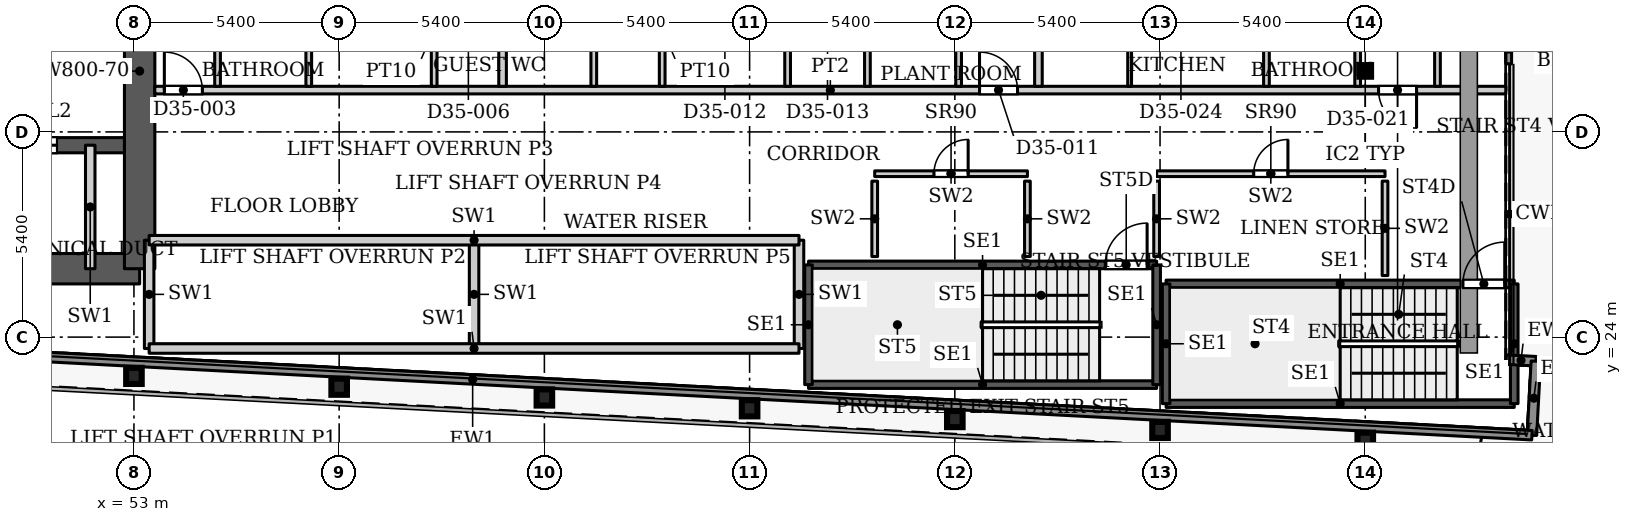
"""IFC4 building model, lengths in metres.
Left out: names, types, materials, properties, quantities, classifications, styles, units other than length and angle.
Written with IfcOpenShell. Run it as: python <this file> out.ifc"""

import sys

from ifc_helpers import new_model, si_unit, direction, frame, frame_2d, origin, origin_2d, place, context, subcontext, project, spatial, rectangle, hollow_rectangle, i_section, extrude, source, transform, mapped, element, fill, save


model = new_model("IFC4")
c1 = context("Model", 3, precision=1e-05, world=origin(), true_north=direction((0.0, 1.0)))
c2 = subcontext(c1, "Body", "Model", "MODEL_VIEW")
j1 = project(units=[si_unit("LENGTHUNIT", "METRE"), si_unit("PLANEANGLEUNIT", "RADIAN")], contexts=[c1])
p1 = place(None, origin())
s1 = spatial("IfcSite", under=j1, at=p1, CompositionType="ELEMENT")
p2 = place(p1, origin())
s2 = spatial("IfcBuilding", under=s1, at=p2, CompositionType="ELEMENT")
p3 = place(p2, frame((0.0, 0.0, 152.6)))
s3 = spatial("IfcBuildingStorey", under=s2, at=p3, CompositionType="ELEMENT", Elevation=152.6)
for number, where, z_axis, x_axis in (
    (1, (85.4, 21.274, 0.0), (0.0, 0.0, 1.0), (1.0, 0.0, 0.0)),
    (2, (80.0, 21.558, 0.0), (0.0, 0.0, 1.0), (1.0, 0.0, 0.0)),
    (3, (74.6, 21.843, 0.0), (0.0, 0.0, 1.0), (1.0, 0.0, 0.0)),
    (4, (69.2, 22.127, 0.0), (0.0, 0.0, 1.0), (1.0, 0.0, 0.0)),
    (5, (63.8, 22.411, 0.0), (0.0, 0.0, 1.0), (1.0, 0.0, 0.0)),
    (6, (58.4, 22.695, 0.0), (0.0, 0.0, 1.0), (1.0, 0.0, 0.0)),
    (7, (53.0, 22.98, 0.0), (0.0, 0.0, 1.0), (1.0, 0.0, 0.0)),
):
    element("IfcColumn", number, at=place(p3, frame(where, z_axis=z_axis, x_axis=x_axis)), inside=s3, PredefinedType="COLUMN", context=c2, shape_type="SweptSolid", body=[
        extrude(i_section(OverallWidth=0.409, OverallDepth=0.425, WebThickness=0.033, FlangeThickness=0.052, FilletRadius=0.013, at=origin_2d()), origin(), (0.0, 0.0, 1.0), 3.9),
    ])
p4 = place(p3, frame((85.4, 31.005, 0.0), z_axis=(0.0, 0.0, 1.0), x_axis=(1.0, 0.0, 0.0)))
e8 = element("IfcColumn", 8, at=p4, inside=s3, PredefinedType="COLUMN", context=c2, shape_type="SweptSolid", body=[
    extrude(hollow_rectangle(XDim=0.305, YDim=0.305, WallThickness=0.016, InnerFilletRadius=0.016, OuterFilletRadius=0.032, at=origin_2d()), origin(), (0.0, 0.0, 1.0), 3.9),
])
p5 = place(p3, frame((34.75, 25.8, 0.0), z_axis=(0.0, 0.0, 1.0), x_axis=(1.0, 0.0, 0.0)))
e9 = element("IfcWall", 9, at=p5, inside=s3, PredefinedType="SHEAR", context=c2, shape_type="SweptSolid", body=[
    extrude(rectangle(XDim=18.4, YDim=0.8, at=frame_2d((9.2, 0.0))), origin(), (0.0, 0.0, 1.0), 3.9),
])
p6 = place(p3, frame((34.75, 29.05, 0.0), z_axis=(0.0, 0.0, 1.0), x_axis=(1.0, 0.0, 0.0)))
e10 = element("IfcWall", 10, at=p6, inside=s3, PredefinedType="SHEAR", context=c2, shape_type="SweptSolid", body=[
    extrude(rectangle(XDim=18.4, YDim=0.4, at=frame_2d((9.2, 0.0))), origin(), (0.0, 0.0, 1.0), 3.9),
])
p7 = place(p6, frame((0.875, 0.0, 0.0)))
e11 = element("IfcOpeningElement", 11, at=p7, cuts=e10, PredefinedType="OPENING", context=c2, shape_type="SweptSolid", body=[
    extrude(rectangle(XDim=1.1, YDim=2.2, at=frame_2d((0.55, 1.1))), frame((0.0, 0.21, 0.0), z_axis=(0.0, -1.0, 0.0), x_axis=(1.0, 0.0, 0.0)), (0.0, 0.0, 1.0), 0.42),
])
p8 = place(p6, frame((3.725, 0.0, 0.0)))
e12 = element("IfcOpeningElement", 12, at=p8, cuts=e10, PredefinedType="OPENING", context=c2, shape_type="SweptSolid", body=[
    extrude(rectangle(XDim=1.1, YDim=2.2, at=frame_2d((0.55, 1.1))), frame((0.0, 0.21, 0.0), z_axis=(0.0, -1.0, 0.0), x_axis=(1.0, 0.0, 0.0)), (0.0, 0.0, 1.0), 0.42),
])
p9 = place(p6, frame((6.575, 0.0, 0.0)))
e13 = element("IfcOpeningElement", 13, at=p9, cuts=e10, PredefinedType="OPENING", context=c2, shape_type="SweptSolid", body=[
    extrude(rectangle(XDim=1.1, YDim=2.2, at=frame_2d((0.55, 1.1))), frame((0.0, 0.21, 0.0), z_axis=(0.0, -1.0, 0.0), x_axis=(1.0, 0.0, 0.0)), (0.0, 0.0, 1.0), 0.42),
])
p10 = place(p6, frame((9.425, 0.0, 0.0)))
e14 = element("IfcOpeningElement", 14, at=p10, cuts=e10, PredefinedType="OPENING", context=c2, shape_type="SweptSolid", body=[
    extrude(rectangle(XDim=1.1, YDim=2.2, at=frame_2d((0.55, 1.1))), frame((0.0, 0.21, 0.0), z_axis=(0.0, -1.0, 0.0), x_axis=(1.0, 0.0, 0.0)), (0.0, 0.0, 1.0), 0.42),
])
p11 = place(p6, frame((12.275, 0.0, 0.0)))
e15 = element("IfcOpeningElement", 15, at=p11, cuts=e10, PredefinedType="OPENING", context=c2, shape_type="SweptSolid", body=[
    extrude(rectangle(XDim=1.1, YDim=2.2, at=frame_2d((0.55, 1.1))), frame((0.0, 0.21, 0.0), z_axis=(0.0, -1.0, 0.0), x_axis=(1.0, 0.0, 0.0)), (0.0, 0.0, 1.0), 0.42),
])
p12 = place(p6, frame((15.125, 0.0, 0.0)))
e16 = element("IfcOpeningElement", 16, at=p12, cuts=e10, PredefinedType="OPENING", context=c2, shape_type="SweptSolid", body=[
    extrude(rectangle(XDim=1.1, YDim=2.2, at=frame_2d((0.55, 1.1))), frame((0.0, 0.21, 0.0), z_axis=(0.0, -1.0, 0.0), x_axis=(1.0, 0.0, 0.0)), (0.0, 0.0, 1.0), 0.42),
])
p13 = place(p3, frame((53.15, 25.8, 0.0), z_axis=(0.0, 0.0, 1.0), x_axis=(0.0, 1.0, 0.0)))
e17 = element("IfcWall", 17, at=p13, inside=s3, PredefinedType="SHEAR", context=c2, shape_type="SweptSolid", body=[
    extrude(rectangle(XDim=10.4, YDim=0.8, at=frame_2d((5.2, 0.0))), origin(), (0.0, 0.0, 1.0), 3.9),
])
p14 = place(p3, frame((89.175, 33.591, 0.0), z_axis=(0.0, 0.0, 1.0), x_axis=(0.0, -1.0, 0.0)))
e18 = element("IfcWall", 18, at=p14, inside=s3, PredefinedType="SOLIDWALL", context=c2, shape_type="SweptSolid", body=[
    extrude(rectangle(XDim=2.4, YDim=0.15, at=frame_2d((1.2, 0.0))), origin(), (0.0, 0.0, 1.0), 3.75),
])
p15 = place(p14, frame((0.3, 0.0, 0.0)))
e19 = element("IfcOpeningElement", 19, at=p15, cuts=e18, PredefinedType="OPENING", context=c2, shape_type="SweptSolid", body=[
    extrude(rectangle(XDim=1.8, YDim=2.4, at=frame_2d((0.9, 1.2))), frame((0.0, 0.085, 0.0), z_axis=(0.0, -1.0, 0.0), x_axis=(1.0, 0.0, 0.0)), (0.0, 0.0, 1.0), 0.17),
])
p16 = place(p3, frame((89.107, 23.408, 0.0), z_axis=(0.0, 0.0, 1.0), x_axis=(0.998561284263, -0.053622398031, 0.0)))
e20 = element("IfcWall", 20, at=p16, inside=s3, PredefinedType="SOLIDWALL", context=c2, shape_type="SweptSolid", body=[
    extrude(rectangle(XDim=0.783, YDim=0.25, at=frame_2d((0.392, 0.0))), origin(), (0.0, 0.0, 1.0), 3.75),
])
p17 = place(p3, frame((89.889, 23.366, 0.0), z_axis=(0.0, 0.0, 1.0), x_axis=(-0.052841433274, -0.998602915542, 0.0)))
e21 = element("IfcWall", 21, at=p17, inside=s3, PredefinedType="SOLIDWALL", context=c2, shape_type="SweptSolid", body=[
    extrude(rectangle(XDim=1.95, YDim=0.25, at=frame_2d((0.975, 0.0))), origin(), (0.0, 0.0, 1.0), 3.75),
])
p18 = place(p3, frame((89.786, 21.419, 0.0), z_axis=(0.0, 0.0, 1.0), x_axis=(-0.998617793089, 0.052559521752, 0.0)))
e22 = element("IfcWall", 22, at=p18, inside=s3, PredefinedType="SOLIDWALL", context=c2, shape_type="SweptSolid", body=[
    extrude(rectangle(XDim=55.824, YDim=0.25, at=frame_2d((27.912, 0.0))), origin(), (0.0, 0.0, 1.0), 3.75),
])
p19 = place(p3, frame((80.16, 22.25, 0.0), z_axis=(0.0, 0.0, 1.0), x_axis=(1.0, 0.0, 0.0)))
e23 = element("IfcWall", 23, at=p19, inside=s3, PredefinedType="SHEAR", context=c2, shape_type="SweptSolid", body=[
    extrude(rectangle(XDim=9.16, YDim=0.2, at=frame_2d((4.58, 0.0))), origin(), (0.0, 0.0, 1.0), 3.9),
])
p20 = place(p3, frame((80.16, 25.4, 0.0), z_axis=(0.0, 0.0, 1.0), x_axis=(1.0, 0.0, 0.0)))
e24 = element("IfcWall", 24, at=p20, inside=s3, PredefinedType="SHEAR", context=c2, shape_type="SweptSolid", body=[
    extrude(rectangle(XDim=9.16, YDim=0.2, at=frame_2d((4.58, 0.0))), origin(), (0.0, 0.0, 1.0), 3.9),
])
p21 = place(p20, frame((7.81, 0.0, 0.0)))
e25 = element("IfcOpeningElement", 25, at=p21, cuts=e24, PredefinedType="OPENING", context=c2, shape_type="SweptSolid", body=[
    extrude(rectangle(XDim=1.1, YDim=2.2, at=frame_2d((0.55, 1.1))), frame((0.0, 0.11, 0.0), z_axis=(0.0, -1.0, 0.0), x_axis=(1.0, 0.0, 0.0)), (0.0, 0.0, 1.0), 0.22),
])
for number, where, z_axis, x_axis in (
    (26, (80.16, 22.25, 0.0), (0.0, 0.0, 1.0), (0.0, 1.0, 0.0)),
    (27, (89.32, 22.25, 0.0), (0.0, 0.0, 1.0), (0.0, 1.0, 0.0)),
):
    element("IfcWall", number, at=place(p3, frame(where, z_axis=z_axis, x_axis=x_axis)), inside=s3, PredefinedType="SHEAR", context=c2, shape_type="SweptSolid", body=[
        extrude(rectangle(XDim=3.15, YDim=0.2, at=frame_2d((1.575, 0.0))), origin(), (0.0, 0.0, 1.0), 3.9),
    ])
p22 = place(p3, frame((70.75, 22.75, 0.0), z_axis=(0.0, 0.0, 1.0), x_axis=(1.0, 0.0, 0.0)))
e28 = element("IfcWall", 28, at=p22, inside=s3, PredefinedType="SHEAR", context=c2, shape_type="SweptSolid", body=[
    extrude(rectangle(XDim=9.16, YDim=0.2, at=frame_2d((4.58, 0.0))), origin(), (0.0, 0.0, 1.0), 3.9),
])
p23 = place(p3, frame((70.75, 25.9, 0.0), z_axis=(0.0, 0.0, 1.0), x_axis=(1.0, 0.0, 0.0)))
e29 = element("IfcWall", 29, at=p23, inside=s3, PredefinedType="SHEAR", context=c2, shape_type="SweptSolid", body=[
    extrude(rectangle(XDim=9.16, YDim=0.2, at=frame_2d((4.58, 0.0))), origin(), (0.0, 0.0, 1.0), 3.9),
])
p24 = place(p23, frame((7.81, 0.0, 0.0)))
e30 = element("IfcOpeningElement", 30, at=p24, cuts=e29, PredefinedType="OPENING", context=c2, shape_type="SweptSolid", body=[
    extrude(rectangle(XDim=1.1, YDim=2.2, at=frame_2d((0.55, 1.1))), frame((0.0, 0.11, 0.0), z_axis=(0.0, -1.0, 0.0), x_axis=(1.0, 0.0, 0.0)), (0.0, 0.0, 1.0), 0.22),
])
for number, where, z_axis, x_axis in (
    (31, (70.75, 22.75, 0.0), (0.0, 0.0, 1.0), (0.0, 1.0, 0.0)),
    (32, (79.91, 22.75, 0.0), (0.0, 0.0, 1.0), (0.0, 1.0, 0.0)),
):
    element("IfcWall", number, at=place(p3, frame(where, z_axis=z_axis, x_axis=x_axis)), inside=s3, PredefinedType="SHEAR", context=c2, shape_type="SweptSolid", body=[
        extrude(rectangle(XDim=3.15, YDim=0.2, at=frame_2d((1.575, 0.0))), origin(), (0.0, 0.0, 1.0), 3.9),
    ])
p25 = place(p3, frame((51.85, 25.8, 0.0), z_axis=(0.0, 0.0, 1.0), x_axis=(0.0, 1.0, 0.0)))
e33 = element("IfcWall", 33, at=p25, inside=s3, PredefinedType="PARTITIONING", context=c2, shape_type="SweptSolid", body=[
    extrude(rectangle(XDim=3.25, YDim=0.25, at=frame_2d((1.625, 0.0))), origin(), (0.0, 0.0, 1.0), 3.9),
])
for number, where, z_axis, x_axis in (
    (34, (53.4, 23.7, 0.0), (0.0, 0.0, 1.0), (0.0, 1.0, 0.0)),
    (35, (61.95, 23.7, 0.0), (0.0, 0.0, 1.0), (0.0, 1.0, 0.0)),
    (36, (70.5, 23.7, 0.0), (0.0, 0.0, 1.0), (0.0, 1.0, 0.0)),
):
    element("IfcWall", number, at=place(p3, frame(where, z_axis=z_axis, x_axis=x_axis)), inside=s3, PredefinedType="PARTITIONING", context=c2, shape_type="SweptSolid", body=[
        extrude(rectangle(XDim=2.85, YDim=0.25, at=frame_2d((1.425, 0.0))), origin(), (0.0, 0.0, 1.0), 3.9),
    ])
for number, where, z_axis, x_axis in (
    (37, (53.4, 23.7, 0.0), (0.0, 0.0, 1.0), (1.0, 0.0, 0.0)),
    (38, (53.4, 26.55, 0.0), (0.0, 0.0, 1.0), (1.0, 0.0, 0.0)),
):
    element("IfcWall", number, at=place(p3, frame(where, z_axis=z_axis, x_axis=x_axis)), inside=s3, PredefinedType="PARTITIONING", context=c2, shape_type="SweptSolid", body=[
        extrude(rectangle(XDim=17.1, YDim=0.25, at=frame_2d((8.55, 0.0))), origin(), (0.0, 0.0, 1.0), 3.9),
    ])
p26 = place(p3, frame((72.492, 28.3, 0.0), z_axis=(0.0, 0.0, 1.0), x_axis=(1.0, 0.0, 0.0)))
e39 = element("IfcWall", 39, at=p26, inside=s3, PredefinedType="PARTITIONING", context=c2, shape_type="SweptSolid", body=[
    extrude(rectangle(XDim=4.018, YDim=0.15, at=frame_2d((2.009, 0.0))), origin(), (0.0, 0.0, 1.0), 3.9),
])
p27 = place(p26, frame((1.559, 0.0, 0.0)))
e40 = element("IfcOpeningElement", 40, at=p27, cuts=e39, PredefinedType="OPENING", context=c2, shape_type="SweptSolid", body=[
    extrude(rectangle(XDim=0.9, YDim=2.2, at=frame_2d((0.45, 1.1))), frame((0.0, 0.085, 0.0), z_axis=(0.0, -1.0, 0.0), x_axis=(1.0, 0.0, 0.0)), (0.0, 0.0, 1.0), 0.17),
])
for number, where, z_axis, x_axis in (
    (41, (72.492, 26.12, 0.0), (0.0, 0.0, 1.0), (0.0, 1.0, 0.0)),
    (42, (76.51, 26.12, 0.0), (0.0, 0.0, 1.0), (0.0, 1.0, 0.0)),
):
    element("IfcWall", number, at=place(p3, frame(where, z_axis=z_axis, x_axis=x_axis)), inside=s3, PredefinedType="PARTITIONING", context=c2, shape_type="SweptSolid", body=[
        extrude(rectangle(XDim=1.985, YDim=0.15, at=frame_2d((0.992, 0.0))), origin(), (0.0, 0.0, 1.0), 3.9),
    ])
p28 = place(p3, frame((79.91, 28.3, 0.0), z_axis=(0.0, 0.0, 1.0), x_axis=(1.0, 0.0, 0.0)))
e43 = element("IfcWall", 43, at=p28, inside=s3, PredefinedType="PARTITIONING", context=c2, shape_type="SweptSolid", body=[
    extrude(rectangle(XDim=6.01, YDim=0.15, at=frame_2d((3.005, 0.0))), origin(), (0.0, 0.0, 1.0), 3.9),
])
p29 = place(p28, frame((2.555, 0.0, 0.0)))
e44 = element("IfcOpeningElement", 44, at=p29, cuts=e43, PredefinedType="OPENING", context=c2, shape_type="SweptSolid", body=[
    extrude(rectangle(XDim=0.9, YDim=2.2, at=frame_2d((0.45, 1.1))), frame((0.0, 0.085, 0.0), z_axis=(0.0, -1.0, 0.0), x_axis=(1.0, 0.0, 0.0)), (0.0, 0.0, 1.0), 0.17),
])
p30 = place(p3, frame((79.91, 26.12, 0.0), z_axis=(0.0, 0.0, 1.0), x_axis=(0.0, 1.0, 0.0)))
e45 = element("IfcWall", 45, at=p30, inside=s3, PredefinedType="PARTITIONING", context=c2, shape_type="SweptSolid", body=[
    extrude(rectangle(XDim=1.985, YDim=0.15, at=frame_2d((0.992, 0.0))), origin(), (0.0, 0.0, 1.0), 3.9),
])
p31 = place(p3, frame((85.92, 25.62, 0.0), z_axis=(0.0, 0.0, 1.0), x_axis=(0.0, 1.0, 0.0)))
e46 = element("IfcWall", 46, at=p31, inside=s3, PredefinedType="PARTITIONING", context=c2, shape_type="SweptSolid", body=[
    extrude(rectangle(XDim=2.485, YDim=0.15, at=frame_2d((1.242, 0.0))), origin(), (0.0, 0.0, 1.0), 3.9),
])
p32 = place(p3, frame((53.549, 30.5, 0.0), z_axis=(0.0, 0.0, 1.0), x_axis=(1.0, 0.0, 0.0)))
e47 = element("IfcWall", 47, at=p32, inside=s3, PredefinedType="PARTITIONING", context=c2, shape_type="SweptSolid", body=[
    extrude(rectangle(XDim=35.551, YDim=0.2, at=frame_2d((17.775, 0.0))), origin(), (0.0, 0.0, 1.0), 3.6),
])
p33 = place(p32, frame((0.251, 0.0, 0.0)))
e48 = element("IfcOpeningElement", 48, at=p33, cuts=e47, PredefinedType="OPENING", context=c2, shape_type="SweptSolid", body=[
    extrude(rectangle(XDim=1.0, YDim=2.1, at=frame_2d((0.5, 1.05))), frame((0.0, 0.11, 0.0), z_axis=(0.0, -1.0, 0.0), x_axis=(1.0, 0.0, 0.0)), (0.0, 0.0, 1.0), 0.22),
])
p34 = place(p32, frame((21.701, 0.0, 0.0)))
e49 = element("IfcOpeningElement", 49, at=p34, cuts=e47, PredefinedType="OPENING", context=c2, shape_type="SweptSolid", body=[
    extrude(rectangle(XDim=1.0, YDim=2.1, at=frame_2d((0.5, 1.05))), frame((0.0, 0.11, 0.0), z_axis=(0.0, -1.0, 0.0), x_axis=(1.0, 0.0, 0.0)), (0.0, 0.0, 1.0), 0.22),
])
p35 = place(p32, frame((32.201, 0.0, 0.0)))
e50 = element("IfcOpeningElement", 50, at=p35, cuts=e47, PredefinedType="OPENING", context=c2, shape_type="SweptSolid", body=[
    extrude(rectangle(XDim=1.0, YDim=2.1, at=frame_2d((0.5, 1.05))), frame((0.0, 0.11, 0.0), z_axis=(0.0, -1.0, 0.0), x_axis=(1.0, 0.0, 0.0)), (0.0, 0.0, 1.0), 0.22),
])
for number, where, z_axis, x_axis in (
    (51, (55.2, 30.6, 0.0), (0.0, 0.0, 1.0), (0.0, 1.0, 0.0)),
    (52, (57.6, 30.6, 0.0), (0.0, 0.0, 1.0), (0.0, 1.0, 0.0)),
    (53, (60.9, 30.6, 0.0), (0.0, 0.0, 1.0), (0.0, 1.0, 0.0)),
):
    element("IfcWall", number, at=place(p3, frame(where, z_axis=z_axis, x_axis=x_axis)), inside=s3, PredefinedType="PARTITIONING", context=c2, shape_type="SweptSolid", body=[
        extrude(rectangle(XDim=3.025, YDim=0.15, at=frame_2d((1.512, 0.0))), origin(), (0.0, 0.0, 1.0), 3.6),
    ])
p36 = place(p3, frame((62.7, 30.6, 0.0), z_axis=(0.0, 0.0, 1.0), x_axis=(0.0, 1.0, 0.0)))
e54 = element("IfcWall", 54, at=p36, inside=s3, PredefinedType="PARTITIONING", context=c2, shape_type="SweptSolid", body=[
    extrude(rectangle(XDim=13.3, YDim=0.2, at=frame_2d((6.65, 0.0))), origin(), (0.0, 0.0, 1.0), 3.6),
])
for number, where, z_axis, x_axis in (
    (55, (65.1, 30.6, 0.0), (0.0, 0.0, 1.0), (0.0, 1.0, 0.0)),
    (56, (66.9, 30.6, 0.0), (0.0, 0.0, 1.0), (0.0, 1.0, 0.0)),
    (57, (70.2, 30.6, 0.0), (0.0, 0.0, 1.0), (0.0, 1.0, 0.0)),
    (58, (72.3, 30.6, 0.0), (0.0, 0.0, 1.0), (0.0, 1.0, 0.0)),
    (59, (74.7, 30.6, 0.0), (0.0, 0.0, 1.0), (0.0, 1.0, 0.0)),
):
    element("IfcWall", number, at=place(p3, frame(where, z_axis=z_axis, x_axis=x_axis)), inside=s3, PredefinedType="PARTITIONING", context=c2, shape_type="SweptSolid", body=[
        extrude(rectangle(XDim=3.025, YDim=0.15, at=frame_2d((1.512, 0.0))), origin(), (0.0, 0.0, 1.0), 3.6),
    ])
p37 = place(p3, frame((76.8, 30.6, 0.0), z_axis=(0.0, 0.0, 1.0), x_axis=(0.0, 1.0, 0.0)))
e60 = element("IfcWall", 60, at=p37, inside=s3, PredefinedType="PARTITIONING", context=c2, shape_type="SweptSolid", body=[
    extrude(rectangle(XDim=13.3, YDim=0.2, at=frame_2d((6.65, 0.0))), origin(), (0.0, 0.0, 1.0), 3.6),
])
p38 = place(p3, frame((79.2, 30.6, 0.0), z_axis=(0.0, 0.0, 1.0), x_axis=(0.0, 1.0, 0.0)))
e61 = element("IfcWall", 61, at=p38, inside=s3, PredefinedType="PARTITIONING", context=c2, shape_type="SweptSolid", body=[
    extrude(rectangle(XDim=3.025, YDim=0.1, at=frame_2d((1.512, 0.0))), origin(), (0.0, 0.0, 1.0), 3.6),
])
p39 = place(p3, frame((82.8, 30.6, 0.0), z_axis=(0.0, 0.0, 1.0), x_axis=(0.0, 1.0, 0.0)))
e62 = element("IfcWall", 62, at=p39, inside=s3, PredefinedType="PARTITIONING", context=c2, shape_type="SweptSolid", body=[
    extrude(rectangle(XDim=3.025, YDim=0.15, at=frame_2d((1.512, 0.0))), origin(), (0.0, 0.0, 1.0), 3.6),
])
p40 = place(p3, frame((85.2, 30.6, 0.0), z_axis=(0.0, 0.0, 1.0), x_axis=(0.0, 1.0, 0.0)))
e63 = element("IfcWall", 63, at=p40, inside=s3, PredefinedType="PARTITIONING", context=c2, shape_type="SweptSolid", body=[
    extrude(rectangle(XDim=3.025, YDim=0.15, at=frame_2d((1.512, 0.0))), origin(), (0.0, 0.0, 1.0), 3.447),
])
p41 = place(p3, frame((87.3, 30.6, 0.0), z_axis=(0.0, 0.0, 1.0), x_axis=(0.0, 1.0, 0.0)))
e64 = element("IfcWall", 64, at=p41, inside=s3, PredefinedType="PARTITIONING", context=c2, shape_type="SweptSolid", body=[
    extrude(rectangle(XDim=3.175, YDim=0.15, at=frame_2d((1.587, 0.0))), origin(), (0.0, 0.0, 1.0), 3.6),
])
m1 = source(origin(), c2, "Body", "SweptSolid", [
    extrude(rectangle(XDim=1.8, YDim=2.4, at=frame_2d((0.9, 1.2))), frame((0.0, 0.025, 0.0), z_axis=(0.0, -1.0, 0.0), x_axis=(1.0, 0.0, 0.0)), (0.0, 0.0, 1.0), 0.05),
])
p42 = place(p15, origin())
e65 = element("IfcDoor", 65, at=p42, inside=s3, OperationType="SLIDING_TO_LEFT", PredefinedType="DOOR", context=c2, shape_type="MappedRepresentation", body=[
    mapped(m1, transform((0.0, 0.0, 0.0), x_axis=(1.0, 0.0, 0.0), y_axis=(0.0, 1.0, 0.0), z_axis=(0.0, 0.0, 1.0), scale=1.0)),
])
fill(e19, e65)
m2 = source(origin(), c2, "Body", "SweptSolid", [
    extrude(rectangle(XDim=1.1, YDim=2.2, at=frame_2d((0.55, 1.1))), frame((0.0, 0.025, 0.0), z_axis=(0.0, -1.0, 0.0), x_axis=(1.0, 0.0, 0.0)), (0.0, 0.0, 1.0), 0.05),
])
p43 = place(p12, origin())
e66 = element("IfcDoor", 66, at=p43, inside=s3, OperationType="SLIDING_TO_LEFT", PredefinedType="DOOR", context=c2, shape_type="MappedRepresentation", body=[
    mapped(m2, transform((0.0, 0.0, 0.0), x_axis=(1.0, 0.0, 0.0), y_axis=(0.0, 1.0, 0.0), z_axis=(0.0, 0.0, 1.0), scale=1.0)),
])
fill(e16, e66)
m3 = source(origin(), c2, "Body", "SweptSolid", [
    extrude(rectangle(XDim=0.9, YDim=2.2, at=frame_2d((0.45, 1.1))), frame((0.0, 0.025, 0.0), z_axis=(0.0, -1.0, 0.0), x_axis=(1.0, 0.0, 0.0)), (0.0, 0.0, 1.0), 0.05),
])
p44 = place(p27, origin())
e67 = element("IfcDoor", 67, at=p44, inside=s3, OperationType="SINGLE_SWING_LEFT", PredefinedType="DOOR", context=c2, shape_type="MappedRepresentation", body=[
    mapped(m3, transform((0.0, 0.0, 0.0), x_axis=(1.0, 0.0, 0.0), y_axis=(0.0, 1.0, 0.0), z_axis=(0.0, 0.0, 1.0), scale=1.0)),
])
fill(e40, e67)
p45 = place(p29, origin())
e68 = element("IfcDoor", 68, at=p45, inside=s3, OperationType="SINGLE_SWING_LEFT", PredefinedType="DOOR", context=c2, shape_type="MappedRepresentation", body=[
    mapped(m3, transform((0.0, 0.0, 0.0), x_axis=(1.0, 0.0, 0.0), y_axis=(0.0, 1.0, 0.0), z_axis=(0.0, 0.0, 1.0), scale=1.0)),
])
fill(e44, e68)
m4 = source(origin(), c2, "Body", "SweptSolid", [
    extrude(rectangle(XDim=1.1, YDim=2.2, at=frame_2d((0.55, 1.1))), frame((0.0, 0.025, 0.0), z_axis=(0.0, -1.0, 0.0), x_axis=(1.0, 0.0, 0.0)), (0.0, 0.0, 1.0), 0.05),
])
p46 = place(p21, origin())
e69 = element("IfcDoor", 69, at=p46, inside=s3, OperationType="SINGLE_SWING_LEFT", PredefinedType="DOOR", context=c2, shape_type="MappedRepresentation", body=[
    mapped(m4, transform((0.0, 0.0, 0.0), x_axis=(1.0, 0.0, 0.0), y_axis=(0.0, 1.0, 0.0), z_axis=(0.0, 0.0, 1.0), scale=1.0)),
])
fill(e25, e69)
p47 = place(p24, origin())
e70 = element("IfcDoor", 70, at=p47, inside=s3, OperationType="SINGLE_SWING_LEFT", PredefinedType="DOOR", context=c2, shape_type="MappedRepresentation", body=[
    mapped(m4, transform((0.0, 0.0, 0.0), x_axis=(1.0, 0.0, 0.0), y_axis=(0.0, 1.0, 0.0), z_axis=(0.0, 0.0, 1.0), scale=1.0)),
])
fill(e30, e70)
m5 = source(origin(), c2, "Body", "SweptSolid", [
    extrude(rectangle(XDim=1.0, YDim=2.1, at=frame_2d((0.5, 1.05))), frame((0.0, 0.025, 0.0), z_axis=(0.0, -1.0, 0.0), x_axis=(1.0, 0.0, 0.0)), (0.0, 0.0, 1.0), 0.05),
])
p48 = place(p33, origin())
e71 = element("IfcDoor", 71, at=p48, inside=s3, OperationType="SINGLE_SWING_LEFT", PredefinedType="DOOR", context=c2, shape_type="MappedRepresentation", body=[
    mapped(m5, transform((0.0, 0.0, 0.0), x_axis=(1.0, 0.0, 0.0), y_axis=(0.0, 1.0, 0.0), z_axis=(0.0, 0.0, 1.0), scale=1.0)),
])
fill(e48, e71)
p49 = place(p34, origin())
e72 = element("IfcDoor", 72, at=p49, inside=s3, OperationType="SINGLE_SWING_LEFT", PredefinedType="DOOR", context=c2, shape_type="MappedRepresentation", body=[
    mapped(m5, transform((0.0, 0.0, 0.0), x_axis=(1.0, 0.0, 0.0), y_axis=(0.0, 1.0, 0.0), z_axis=(0.0, 0.0, 1.0), scale=1.0)),
])
fill(e49, e72)
p50 = place(p35, origin())
e73 = element("IfcDoor", 73, at=p50, inside=s3, OperationType="SINGLE_SWING_RIGHT", PredefinedType="DOOR", context=c2, shape_type="MappedRepresentation", body=[
    mapped(m5, transform((0.0, 0.0, 0.0), x_axis=(1.0, 0.0, 0.0), y_axis=(0.0, 1.0, 0.0), z_axis=(0.0, 0.0, 1.0), scale=1.0)),
])
fill(e50, e73)
save(model, sys.argv[1])
